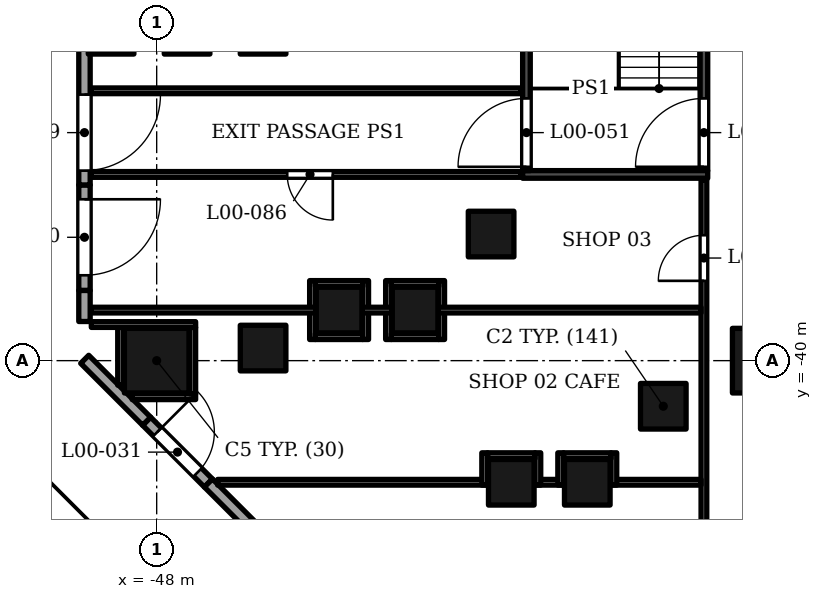
"""IFC4 building model, lengths in metres.
Left out: names, types, materials, properties, quantities, classifications, styles, units other than length and angle.
Written with IfcOpenShell. Run it as: python <this file> out.ifc"""

import sys

from ifc_helpers import new_model, si_unit, direction, frame, frame_2d, origin, origin_2d, place, context, subcontext, project, spatial, rectangle, extrude, element, fill, save


model = new_model("IFC4")
c1 = context("Model", 3, precision=1e-05, world=origin(), true_north=direction((0.0, 1.0)))
c2 = subcontext(c1, "Body", "Model", "MODEL_VIEW")
j1 = project(units=[si_unit("LENGTHUNIT", "METRE"), si_unit("PLANEANGLEUNIT", "RADIAN")], contexts=[c1])
p1 = place(None, origin())
s1 = spatial("IfcSite", under=j1, at=p1, CompositionType="ELEMENT")
p2 = place(p1, origin())
s2 = spatial("IfcBuilding", under=s1, at=p2, CompositionType="ELEMENT")
p3 = place(p2, origin())
s3 = spatial("IfcBuildingStorey", under=s2, at=p3, CompositionType="ELEMENT", Elevation=0.0)
for number, where, z_axis, x_axis in (
    (1, (-48.0, -40.0, 0.0), (0.0, 0.0, 1.0), (1.0, 0.0, 0.0)),
    (2, (-32.0, -40.0, 0.0), (0.0, 0.0, 1.0), (1.0, 0.0, 0.0)),
):
    element("IfcColumn", number, at=place(p3, frame(where, z_axis=z_axis, x_axis=x_axis)), inside=s3, PredefinedType="COLUMN", context=c2, shape_type="SweptSolid", body=[
        extrude(rectangle(XDim=1.7, YDim=1.7, at=origin_2d()), origin(), (0.0, 0.0, 1.0), 9.0),
    ])
for number, where, z_axis, x_axis in (
    (3, (-34.669, -41.2, 0.0), (0.0, 0.0, 1.0), (1.0, 0.0, 0.0)),
    (4, (-39.2, -36.669, 0.0), (0.0, 0.0, 1.0), (1.0, 0.0, 0.0)),
    (5, (-36.669, -43.2, 0.0), (0.0, 0.0, 1.0), (1.0, 0.0, 0.0)),
    (6, (-41.2, -38.669, 0.0), (0.0, 0.0, 1.0), (1.0, 0.0, 0.0)),
    (7, (-38.669, -43.2, 0.0), (0.0, 0.0, 1.0), (1.0, 0.0, 0.0)),
    (8, (-43.2, -38.669, 0.0), (0.0, 0.0, 1.0), (1.0, 0.0, 0.0)),
    (9, (-45.2, -39.669, 0.0), (0.0, 0.0, 1.0), (1.0, 0.0, 0.0)),
    (10, (-45.2, -31.333, 0.0), (0.0, 0.0, 1.0), (1.0, 0.0, 0.0)),
    (11, (-47.2, -31.333, 0.0), (0.0, 0.0, 1.0), (1.0, 0.0, 0.0)),
    (12, (-49.2, -31.333, 0.0), (0.0, 0.0, 1.0), (1.0, 0.0, 0.0)),
):
    element("IfcColumn", number, at=place(p3, frame(where, z_axis=z_axis, x_axis=x_axis)), inside=s3, PredefinedType="COLUMN", context=c2, shape_type="SweptSolid", body=[
        extrude(rectangle(XDim=1.2, YDim=1.2, at=origin_2d()), origin(), (0.0, 0.0, 1.0), 9.0),
    ])
p4 = place(p3, frame((-49.9, -31.377, 0.0), z_axis=(0.0, 0.0, 1.0), x_axis=(0.0, -1.0, 0.0)))
e13 = element("IfcWall", 13, at=p4, inside=s3, PredefinedType="ELEMENTEDWALL", context=c2, shape_type="SweptSolid", body=[
    extrude(rectangle(XDim=4.0, YDim=0.3, at=frame_2d((2.0, 0.0))), origin(), (0.0, 0.0, 1.0), 7.6),
])
p5 = place(p4, frame((1.623, 0.0, 0.0)))
e14 = element("IfcOpeningElement", 14, at=p5, cuts=e13, PredefinedType="OPENING", context=c2, shape_type="SweptSolid", body=[
    extrude(rectangle(XDim=2.0, YDim=2.4, at=frame_2d((1.0, 1.2))), frame((0.0, 0.16, 0.0), z_axis=(0.0, -1.0, 0.0), x_axis=(1.0, 0.0, 0.0)), (0.0, 0.0, 1.0), 0.32),
])
p6 = place(p3, frame((-49.9, -35.377, 0.0), z_axis=(0.0, 0.0, 1.0), x_axis=(0.0, -1.0, 0.0)))
e15 = element("IfcWall", 15, at=p6, inside=s3, PredefinedType="ELEMENTEDWALL", context=c2, shape_type="SweptSolid", body=[
    extrude(rectangle(XDim=2.777, YDim=0.3, at=frame_2d((1.389, 0.0))), origin(), (0.0, 0.0, 1.0), 7.6),
])
p7 = place(p6, frame((0.377, 0.0, 0.0)))
e16 = element("IfcOpeningElement", 16, at=p7, cuts=e15, PredefinedType="OPENING", context=c2, shape_type="SweptSolid", body=[
    extrude(rectangle(XDim=2.0, YDim=2.7, at=frame_2d((1.0, 1.35))), frame((0.0, 0.16, 0.0), z_axis=(0.0, -1.0, 0.0), x_axis=(1.0, 0.0, 0.0)), (0.0, 0.0, 1.0), 0.32),
])
p8 = place(p3, frame((-49.9, -38.154, 0.0), z_axis=(0.0, 0.0, 1.0), x_axis=(0.0, -1.0, 0.0)))
e17 = element("IfcWall", 17, at=p8, inside=s3, PredefinedType="SOLIDWALL", context=c2, shape_type="SweptSolid", body=[
    extrude(rectangle(XDim=0.816, YDim=0.3, at=frame_2d((0.408, 0.0))), origin(), (0.0, 0.0, 1.0), 7.6),
])
p9 = place(p3, frame((-48.265, -41.594, 0.0), z_axis=(0.0, 0.0, 1.0), x_axis=(0.707053705054, -0.707159853336, 0.0)))
e18 = element("IfcWall", 18, at=p9, inside=s3, PredefinedType="ELEMENTEDWALL", context=c2, shape_type="SweptSolid", body=[
    extrude(rectangle(XDim=2.3, YDim=0.3, at=frame_2d((1.15, 0.0))), origin(), (0.0, 0.0, 1.0), 7.6),
])
p10 = place(p9, frame((0.4, 0.0, 0.0)))
e19 = element("IfcOpeningElement", 19, at=p10, cuts=e18, PredefinedType="OPENING", context=c2, shape_type="SweptSolid", body=[
    extrude(rectangle(XDim=1.5, YDim=2.7, at=frame_2d((0.75, 1.35))), frame((0.0, 0.16, 0.0), z_axis=(0.0, -1.0, 0.0), x_axis=(1.0, 0.0, 0.0)), (0.0, 0.0, 1.0), 0.32),
])
p11 = place(p3, frame((-49.894, -39.965, 0.0), z_axis=(0.0, 0.0, 1.0), x_axis=(0.707159765846, -0.707053792556, 0.0)))
e20 = element("IfcWall", 20, at=p11, inside=s3, PredefinedType="SOLIDWALL", context=c2, shape_type="SweptSolid", body=[
    extrude(rectangle(XDim=2.304, YDim=0.3, at=frame_2d((1.152, 0.0))), origin(), (0.0, 0.0, 1.0), 7.6),
])
p12 = place(p3, frame((-46.639, -43.22, 0.0), z_axis=(0.0, 0.0, 1.0), x_axis=(0.707106781187, -0.707106781187, 0.0)))
e21 = element("IfcWall", 21, at=p12, inside=s3, PredefinedType="SOLIDWALL", context=c2, shape_type="SweptSolid", body=[
    extrude(rectangle(XDim=3.348, YDim=0.3, at=frame_2d((1.674, 0.0))), origin(), (0.0, 0.0, 1.0), 7.6),
])
p13 = place(p3, frame((-49.85, -25.302, 9.0), z_axis=(0.0, 0.0, 1.0), x_axis=(0.0, -1.0, 0.0)))
e22 = element("IfcWall", 22, at=p13, inside=s3, PredefinedType="PARAPET", context=c2, shape_type="SweptSolid", body=[
    extrude(rectangle(XDim=14.698, YDim=0.3, at=frame_2d((7.349, 0.0))), origin(), (0.0, 0.0, 1.0), 1.1),
])
p14 = place(p3, frame((-49.745, -40.042, 9.0), z_axis=(0.0, 0.0, 1.0), x_axis=(0.707092029666, -0.7071215324, 0.0)))
e23 = element("IfcWall", 23, at=p14, inside=s3, PredefinedType="PARAPET", context=c2, shape_type="SweptSolid", body=[
    extrude(rectangle(XDim=8.275, YDim=0.3, at=frame_2d((4.138, 0.0))), origin(), (0.0, 0.0, 1.0), 1.1),
])
p15 = place(p3, frame((-38.37, -35.1, 0.0), z_axis=(0.0, 0.0, 1.0), x_axis=(1.0, 0.0, 0.0)))
e24 = element("IfcWall", 24, at=p15, inside=s3, PredefinedType="SOLIDWALL", context=c2, shape_type="SweptSolid", body=[
    extrude(rectangle(XDim=4.87, YDim=0.2, at=frame_2d((2.435, 0.0))), origin(), (0.0, 0.0, 1.0), 8.5),
])
p16 = place(p3, frame((-38.27, -35.0, 0.0), z_axis=(0.0, 0.0, 1.0), x_axis=(0.0, 1.0, 0.0)))
e25 = element("IfcWall", 25, at=p16, inside=s3, PredefinedType="SOLIDWALL", context=c2, shape_type="SweptSolid", body=[
    extrude(rectangle(XDim=6.65, YDim=0.2, at=frame_2d((3.325, 0.0))), origin(), (0.0, 0.0, 1.0), 8.5),
])
p17 = place(p16, frame((0.1, 0.0, 0.0)))
e26 = element("IfcOpeningElement", 26, at=p17, cuts=e25, PredefinedType="OPENING", context=c2, shape_type="SweptSolid", body=[
    extrude(rectangle(XDim=1.8, YDim=2.4, at=frame_2d((0.9, 1.2))), frame((0.0, 0.11, 0.0), z_axis=(0.0, -1.0, 0.0), x_axis=(1.0, 0.0, 0.0)), (0.0, 0.0, 1.0), 0.22),
])
p18 = place(p3, frame((-33.6, -35.0, 0.0), z_axis=(0.0, 0.0, 1.0), x_axis=(0.0, 1.0, 0.0)))
e27 = element("IfcWall", 27, at=p18, inside=s3, PredefinedType="SOLIDWALL", context=c2, shape_type="SweptSolid", body=[
    extrude(rectangle(XDim=6.65, YDim=0.2, at=frame_2d((3.325, 0.0))), origin(), (0.0, 0.0, 1.0), 8.5),
])
p19 = place(p18, frame((0.1, 0.0, 0.0)))
e28 = element("IfcOpeningElement", 28, at=p19, cuts=e27, PredefinedType="OPENING", context=c2, shape_type="SweptSolid", body=[
    extrude(rectangle(XDim=1.8, YDim=2.4, at=frame_2d((0.9, 1.2))), frame((0.0, 0.11, 0.0), z_axis=(0.0, -1.0, 0.0), x_axis=(1.0, 0.0, 0.0)), (0.0, 0.0, 1.0), 0.22),
])
p20 = place(p3, frame((-33.6, -44.6, 0.0), z_axis=(0.0, 0.0, 1.0), x_axis=(0.0, 1.0, 0.0)))
e29 = element("IfcWall", 29, at=p20, inside=s3, PredefinedType="PARTITIONING", context=c2, shape_type="SweptSolid", body=[
    extrude(rectangle(XDim=9.36, YDim=0.15, at=frame_2d((4.68, 0.0))), origin(), (0.0, 0.0, 1.0), 7.3),
])
p21 = place(p20, frame((6.7, 0.0, 0.0)))
e30 = element("IfcOpeningElement", 30, at=p21, cuts=e29, PredefinedType="OPENING", context=c2, shape_type="SweptSolid", body=[
    extrude(rectangle(XDim=1.2, YDim=2.1, at=frame_2d((0.6, 1.05))), frame((0.0, 0.085, 0.0), z_axis=(0.0, -1.0, 0.0), x_axis=(1.0, 0.0, 0.0)), (0.0, 0.0, 1.0), 0.17),
])
p22 = place(p3, frame((-46.396, -43.2, 0.0), z_axis=(0.0, 0.0, 1.0), x_axis=(1.0, 0.0, 0.0)))
e31 = element("IfcWall", 31, at=p22, inside=s3, PredefinedType="PARTITIONING", context=c2, shape_type="SweptSolid", body=[
    extrude(rectangle(XDim=7.127, YDim=0.15, at=frame_2d((3.563, 0.0))), origin(), (0.0, 0.0, 1.0), 7.6),
])
p23 = place(p3, frame((-39.369, -43.275, 0.0), z_axis=(0.0, 0.0, 1.0), x_axis=(0.0, 1.0, 0.0)))
e32 = element("IfcWall", 32, at=p23, inside=s3, PredefinedType="PARTITIONING", context=c2, shape_type="SweptSolid", body=[
    extrude(rectangle(XDim=0.85, YDim=0.15, at=frame_2d((0.425, 0.0))), origin(), (0.0, 0.0, 1.0), 8.5),
])
p24 = place(p3, frame((-38.069, -43.2, 0.0), z_axis=(0.0, 0.0, 1.0), x_axis=(1.0, 0.0, 0.0)))
e33 = element("IfcWall", 33, at=p24, inside=s3, PredefinedType="PARTITIONING", context=c2, shape_type="SweptSolid", body=[
    extrude(rectangle(XDim=0.8, YDim=0.15, at=frame_2d((0.4, 0.0))), origin(), (0.0, 0.0, 1.0), 8.5),
])
for number, where, z_axis, x_axis in (
    (34, (-37.969, -43.275, 0.0), (0.0, 0.0, 1.0), (0.0, 1.0, 0.0)),
    (35, (-37.369, -43.275, 0.0), (0.0, 0.0, 1.0), (0.0, 1.0, 0.0)),
):
    element("IfcWall", number, at=place(p3, frame(where, z_axis=z_axis, x_axis=x_axis)), inside=s3, PredefinedType="PARTITIONING", context=c2, shape_type="SweptSolid", body=[
        extrude(rectangle(XDim=0.85, YDim=0.15, at=frame_2d((0.425, 0.0))), origin(), (0.0, 0.0, 1.0), 8.5),
    ])
p25 = place(p3, frame((-36.069, -43.2, 0.0), z_axis=(0.0, 0.0, 1.0), x_axis=(1.0, 0.0, 0.0)))
e36 = element("IfcWall", 36, at=p25, inside=s3, PredefinedType="PARTITIONING", context=c2, shape_type="SweptSolid", body=[
    extrude(rectangle(XDim=2.394, YDim=0.15, at=frame_2d((1.197, 0.0))), origin(), (0.0, 0.0, 1.0), 8.5),
])
p26 = place(p3, frame((-35.969, -43.275, 0.0), z_axis=(0.0, 0.0, 1.0), x_axis=(0.0, 1.0, 0.0)))
e37 = element("IfcWall", 37, at=p26, inside=s3, PredefinedType="PARTITIONING", context=c2, shape_type="SweptSolid", body=[
    extrude(rectangle(XDim=0.85, YDim=0.15, at=frame_2d((0.425, 0.0))), origin(), (0.0, 0.0, 1.0), 8.5),
])
for number, where, z_axis, x_axis in (
    (38, (-39.294, -42.5, 0.0), (0.0, 0.0, 1.0), (1.0, 0.0, 0.0)),
    (39, (-37.294, -42.5, 0.0), (0.0, 0.0, 1.0), (1.0, 0.0, 0.0)),
):
    element("IfcWall", number, at=place(p3, frame(where, z_axis=z_axis, x_axis=x_axis)), inside=s3, PredefinedType="PARTITIONING", context=c2, shape_type="SweptSolid", body=[
        extrude(rectangle(XDim=1.25, YDim=0.15, at=frame_2d((0.625, 0.0))), origin(), (0.0, 0.0, 1.0), 8.5),
    ])
p27 = place(p3, frame((-48.646, -40.95, 0.0), z_axis=(0.0, 0.0, 1.0), x_axis=(1.0, 0.0, 0.0)))
e40 = element("IfcWall", 40, at=p27, inside=s3, PredefinedType="PARTITIONING", context=c2, shape_type="SweptSolid", body=[
    extrude(rectangle(XDim=1.671, YDim=0.15, at=frame_2d((0.835, 0.0))), origin(), (0.0, 0.0, 1.0), 7.6),
])
p28 = place(p3, frame((-47.05, -40.875, 0.0), z_axis=(0.0, 0.0, 1.0), x_axis=(0.0, 1.0, 0.0)))
e41 = element("IfcWall", 41, at=p28, inside=s3, PredefinedType="PARTITIONING", context=c2, shape_type="SweptSolid", body=[
    extrude(rectangle(XDim=1.75, YDim=0.15, at=frame_2d((0.875, 0.0))), origin(), (0.0, 0.0, 1.0), 7.6),
])
p29 = place(p3, frame((-48.95, -40.646, 0.0), z_axis=(0.0, 0.0, 1.0), x_axis=(0.0, 1.0, 0.0)))
e42 = element("IfcWall", 42, at=p29, inside=s3, PredefinedType="PARTITIONING", context=c2, shape_type="SweptSolid", body=[
    extrude(rectangle(XDim=1.521, YDim=0.15, at=frame_2d((0.76, 0.0))), origin(), (0.0, 0.0, 1.0), 8.5),
])
p30 = place(p3, frame((-43.9, -39.444, 0.0), z_axis=(0.0, 0.0, 1.0), x_axis=(0.0, 1.0, 0.0)))
e43 = element("IfcWall", 43, at=p30, inside=s3, PredefinedType="PARTITIONING", context=c2, shape_type="SweptSolid", body=[
    extrude(rectangle(XDim=1.55, YDim=0.15, at=frame_2d((0.775, 0.0))), origin(), (0.0, 0.0, 1.0), 8.5),
])
p31 = place(p3, frame((-43.825, -39.369, 0.0), z_axis=(0.0, 0.0, 1.0), x_axis=(1.0, 0.0, 0.0)))
e44 = element("IfcWall", 44, at=p31, inside=s3, PredefinedType="PARTITIONING", context=c2, shape_type="SweptSolid", body=[
    extrude(rectangle(XDim=1.25, YDim=0.15, at=frame_2d((0.625, 0.0))), origin(), (0.0, 0.0, 1.0), 8.5),
])
for number, where, z_axis, x_axis in (
    (45, (-42.5, -39.444, 0.0), (0.0, 0.0, 1.0), (0.0, 1.0, 0.0)),
    (46, (-41.9, -39.444, 0.0), (0.0, 0.0, 1.0), (0.0, 1.0, 0.0)),
):
    element("IfcWall", number, at=place(p3, frame(where, z_axis=z_axis, x_axis=x_axis)), inside=s3, PredefinedType="PARTITIONING", context=c2, shape_type="SweptSolid", body=[
        extrude(rectangle(XDim=1.55, YDim=0.15, at=frame_2d((0.775, 0.0))), origin(), (0.0, 0.0, 1.0), 8.5),
    ])
p32 = place(p3, frame((-41.825, -39.369, 0.0), z_axis=(0.0, 0.0, 1.0), x_axis=(1.0, 0.0, 0.0)))
e47 = element("IfcWall", 47, at=p32, inside=s3, PredefinedType="PARTITIONING", context=c2, shape_type="SweptSolid", body=[
    extrude(rectangle(XDim=1.25, YDim=0.15, at=frame_2d((0.625, 0.0))), origin(), (0.0, 0.0, 1.0), 8.5),
])
p33 = place(p3, frame((-40.5, -39.444, 0.0), z_axis=(0.0, 0.0, 1.0), x_axis=(0.0, 1.0, 0.0)))
e48 = element("IfcWall", 48, at=p33, inside=s3, PredefinedType="PARTITIONING", context=c2, shape_type="SweptSolid", body=[
    extrude(rectangle(XDim=1.55, YDim=0.15, at=frame_2d((0.775, 0.0))), origin(), (0.0, 0.0, 1.0), 8.5),
])
p34 = place(p3, frame((-49.72, -39.05, 0.0), z_axis=(0.0, 0.0, 1.0), x_axis=(1.0, 0.0, 0.0)))
e49 = element("IfcWall", 49, at=p34, inside=s3, PredefinedType="PARTITIONING", context=c2, shape_type="SweptSolid", body=[
    extrude(rectangle(XDim=2.745, YDim=0.15, at=frame_2d((1.373, 0.0))), origin(), (0.0, 0.0, 1.0), 7.6),
])
p35 = place(p3, frame((-49.72, -38.67, 0.0), z_axis=(0.0, 0.0, 1.0), x_axis=(1.0, 0.0, 0.0)))
e50 = element("IfcWall", 50, at=p35, inside=s3, PredefinedType="PARTITIONING", context=c2, shape_type="SweptSolid", body=[
    extrude(rectangle(XDim=5.92, YDim=0.15, at=frame_2d((2.96, 0.0))), origin(), (0.0, 0.0, 1.0), 7.6),
])
p36 = place(p3, frame((-42.6, -38.67, 0.0), z_axis=(0.0, 0.0, 1.0), x_axis=(1.0, 0.0, 0.0)))
e51 = element("IfcWall", 51, at=p36, inside=s3, PredefinedType="PARTITIONING", context=c2, shape_type="SweptSolid", body=[
    extrude(rectangle(XDim=0.8, YDim=0.15, at=frame_2d((0.4, 0.0))), origin(), (0.0, 0.0, 1.0), 8.5),
])
p37 = place(p3, frame((-40.6, -38.67, 0.0), z_axis=(0.0, 0.0, 1.0), x_axis=(1.0, 0.0, 0.0)))
e52 = element("IfcWall", 52, at=p37, inside=s3, PredefinedType="PARTITIONING", context=c2, shape_type="SweptSolid", body=[
    extrude(rectangle(XDim=6.925, YDim=0.15, at=frame_2d((3.462, 0.0))), origin(), (0.0, 0.0, 1.0), 8.5),
])
for number, where, z_axis, x_axis in (
    (53, (-43.825, -37.969, 0.0), (0.0, 0.0, 1.0), (1.0, 0.0, 0.0)),
    (54, (-41.825, -37.969, 0.0), (0.0, 0.0, 1.0), (1.0, 0.0, 0.0)),
):
    element("IfcWall", number, at=place(p3, frame(where, z_axis=z_axis, x_axis=x_axis)), inside=s3, PredefinedType="PARTITIONING", context=c2, shape_type="SweptSolid", body=[
        extrude(rectangle(XDim=1.25, YDim=0.15, at=frame_2d((0.625, 0.0))), origin(), (0.0, 0.0, 1.0), 8.5),
    ])
p38 = place(p3, frame((-49.72, -35.101, 0.0), z_axis=(0.0, 0.0, 1.0), x_axis=(1.0, 0.0, 0.0)))
e55 = element("IfcWall", 55, at=p38, inside=s3, PredefinedType="PARTITIONING", context=c2, shape_type="SweptSolid", body=[
    extrude(rectangle(XDim=11.31, YDim=0.151, at=frame_2d((5.655, 0.0))), origin(), (0.0, 0.0, 1.0), 7.6),
])
p39 = place(p38, frame((5.155, 0.0, 0.0)))
e56 = element("IfcOpeningElement", 56, at=p39, cuts=e55, PredefinedType="OPENING", context=c2, shape_type="SweptSolid", body=[
    extrude(rectangle(XDim=1.2, YDim=2.1, at=frame_2d((0.6, 1.05))), frame((0.0, 0.085, 0.0), z_axis=(0.0, -1.0, 0.0), x_axis=(1.0, 0.0, 0.0)), (0.0, 0.0, 1.0), 0.171),
])
p40 = place(p3, frame((-49.72, -32.9, 0.0), z_axis=(0.0, 0.0, 1.0), x_axis=(1.0, 0.0, 0.0)))
e57 = element("IfcWall", 57, at=p40, inside=s3, PredefinedType="PARTITIONING", context=c2, shape_type="SweptSolid", body=[
    extrude(rectangle(XDim=11.31, YDim=0.15, at=frame_2d((5.655, 0.0))), origin(), (0.0, 0.0, 1.0), 7.6),
])
p41 = place(p5, origin())
e58 = element("IfcDoor", 58, at=p41, inside=s3, OperationType="DOUBLE_DOOR_SINGLE_SWING", PredefinedType="DOOR", context=c2, shape_type="SweptSolid", body=[
    extrude(rectangle(XDim=2.0, YDim=2.4, at=frame_2d((1.0, 1.2))), frame((0.0, 0.025, 0.0), z_axis=(0.0, -1.0, 0.0), x_axis=(1.0, 0.0, 0.0)), (0.0, 0.0, 1.0), 0.05),
])
fill(e14, e58)
p42 = place(p7, origin())
e59 = element("IfcDoor", 59, at=p42, inside=s3, OperationType="DOUBLE_DOOR_SINGLE_SWING", PredefinedType="DOOR", context=c2, shape_type="SweptSolid", body=[
    extrude(rectangle(XDim=2.0, YDim=2.7, at=frame_2d((1.0, 1.35))), frame((0.0, 0.025, 0.0), z_axis=(0.0, -1.0, 0.0), x_axis=(1.0, 0.0, 0.0)), (0.0, 0.0, 1.0), 0.05),
])
fill(e16, e59)
p43 = place(p10, origin())
e60 = element("IfcDoor", 60, at=p43, inside=s3, OperationType="DOUBLE_DOOR_SINGLE_SWING", PredefinedType="DOOR", context=c2, shape_type="SweptSolid", body=[
    extrude(rectangle(XDim=1.5, YDim=2.7, at=frame_2d((0.75, 1.35))), frame((0.0, 0.025, 0.0), z_axis=(0.0, -1.0, 0.0), x_axis=(1.0, 0.0, 0.0)), (0.0, 0.0, 1.0), 0.05),
])
fill(e19, e60)
p44 = place(p19, origin())
e61 = element("IfcDoor", 61, at=p44, inside=s3, OperationType="DOUBLE_DOOR_SINGLE_SWING", PredefinedType="DOOR", context=c2, shape_type="SweptSolid", body=[
    extrude(rectangle(XDim=1.8, YDim=2.4, at=frame_2d((0.9, 1.2))), frame((0.0, 0.025, 0.0), z_axis=(0.0, -1.0, 0.0), x_axis=(1.0, 0.0, 0.0)), (0.0, 0.0, 1.0), 0.05),
])
fill(e28, e61)
p45 = place(p17, origin())
e62 = element("IfcDoor", 62, at=p45, inside=s3, OperationType="DOUBLE_DOOR_SINGLE_SWING", PredefinedType="DOOR", context=c2, shape_type="SweptSolid", body=[
    extrude(rectangle(XDim=1.8, YDim=2.4, at=frame_2d((0.9, 1.2))), frame((0.0, 0.025, 0.0), z_axis=(0.0, -1.0, 0.0), x_axis=(1.0, 0.0, 0.0)), (0.0, 0.0, 1.0), 0.05),
])
fill(e26, e62)
p46 = place(p21, origin())
e63 = element("IfcDoor", 63, at=p46, inside=s3, OperationType="SINGLE_SWING_LEFT", PredefinedType="DOOR", context=c2, shape_type="SweptSolid", body=[
    extrude(rectangle(XDim=1.2, YDim=2.1, at=frame_2d((0.6, 1.05))), frame((0.0, 0.025, 0.0), z_axis=(0.0, -1.0, 0.0), x_axis=(1.0, 0.0, 0.0)), (0.0, 0.0, 1.0), 0.05),
])
fill(e30, e63)
p47 = place(p39, origin())
e64 = element("IfcDoor", 64, at=p47, inside=s3, OperationType="SINGLE_SWING_RIGHT", PredefinedType="DOOR", context=c2, shape_type="SweptSolid", body=[
    extrude(rectangle(XDim=1.2, YDim=2.1, at=frame_2d((0.6, 1.05))), frame((0.0, 0.025, 0.0), z_axis=(0.0, -1.0, 0.0), x_axis=(1.0, 0.0, 0.0)), (0.0, 0.0, 1.0), 0.05),
])
fill(e56, e64)
save(model, sys.argv[1])
